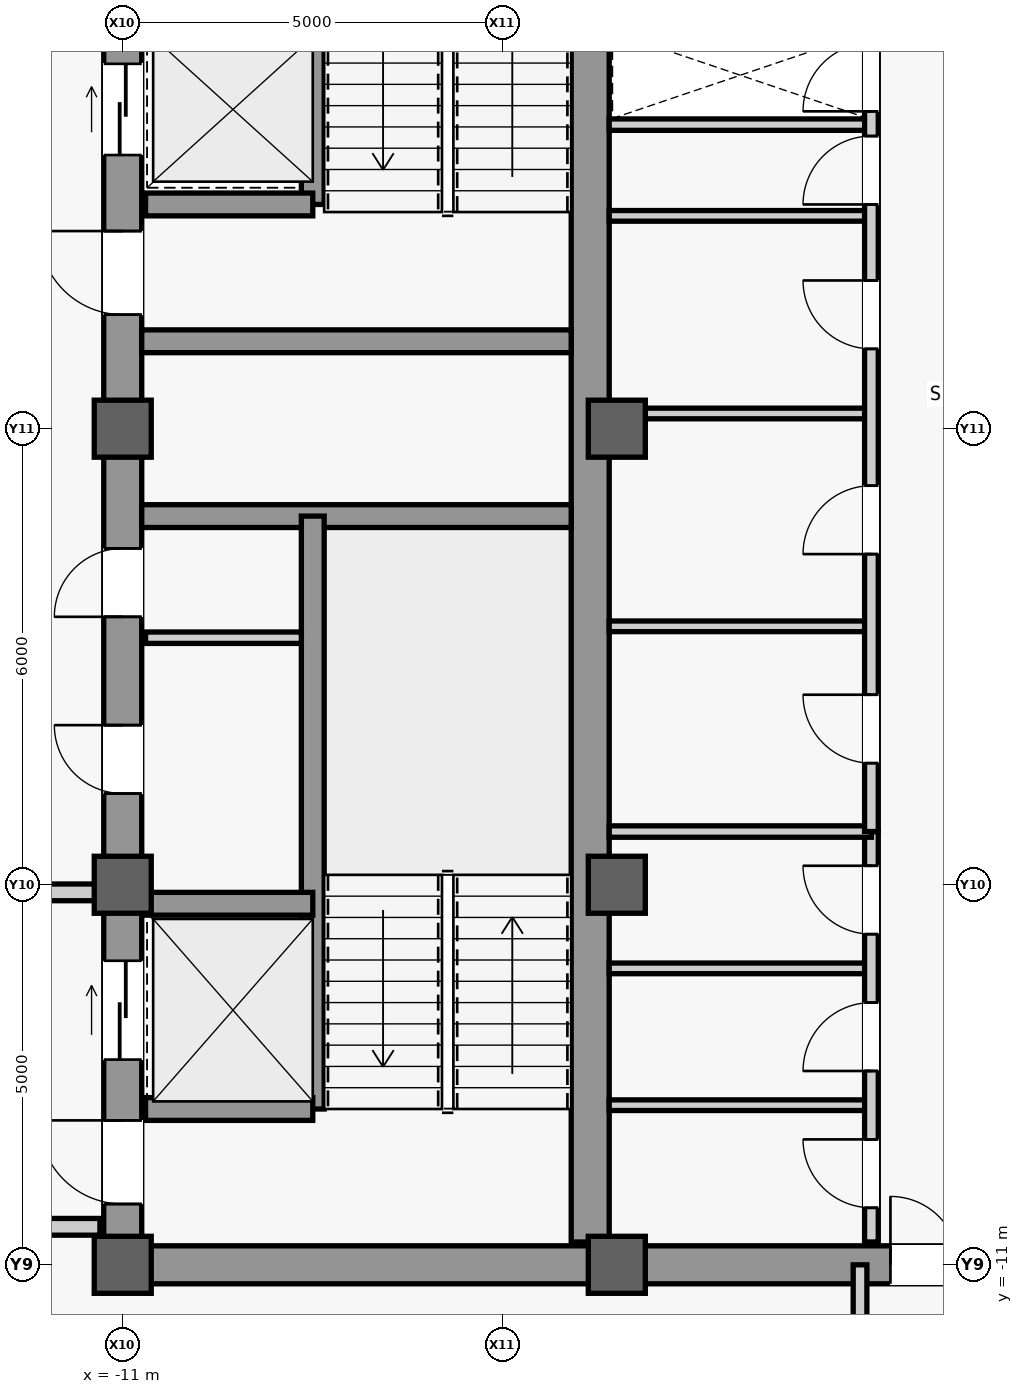
"""IFC4 building model, lengths in metres.
Left out: names, types, materials, properties, quantities, classifications, styles, units other than length and angle.
Written with IfcOpenShell. Run it as: python <this file> out.ifc"""

import sys

from ifc_helpers import new_model, si_unit, direction, frame, frame_2d, origin, origin_2d, place, context, subcontext, project, spatial, rectangle, extrude, source, transform, mapped, element, fill, save


model = new_model("IFC4")
c1 = context("Model", 3, precision=1e-05, world=origin(), true_north=direction((0.0, 1.0)))
c2 = subcontext(c1, "Body", "Model", "MODEL_VIEW")
j1 = project(units=[si_unit("LENGTHUNIT", "METRE"), si_unit("PLANEANGLEUNIT", "RADIAN")], contexts=[c1])
p1 = place(None, origin())
s1 = spatial("IfcSite", under=j1, at=p1, CompositionType="ELEMENT")
p2 = place(p1, origin())
s2 = spatial("IfcBuilding", under=s1, at=p2, CompositionType="ELEMENT")
p3 = place(p2, frame((0.0, 0.0, 358.3)))
s3 = spatial("IfcBuildingStorey", under=s2, at=p3, CompositionType="ELEMENT", Elevation=358.3)
m1 = source(origin(), c2, "Body", "SweptSolid", [
    extrude(rectangle(XDim=22.0, YDim=0.5, at=frame_2d((11.0, 0.0))), origin(), (0.0, 0.0, 1.0), 3.74),
])
p4 = place(p3, frame((-11.0, -11.0, 0.0), z_axis=(0.0, 0.0, 1.0), x_axis=(0.0, 1.0, 0.0)))
e1 = element("IfcWall", 1, at=p4, inside=s3, PredefinedType="SHEAR", context=c2, shape_type="MappedRepresentation", body=[
    mapped(m1, transform((0.0, 0.0, 0.0), scale=1.0)),
])
m2 = source(origin(), c2, "Body", "SweptSolid", [
    extrude(rectangle(XDim=1.1, YDim=2.2, at=frame_2d((0.55, 1.1))), frame((0.0, 0.26, 0.0), z_axis=(0.0, -1.0, 0.0), x_axis=(1.0, 0.0, 0.0)), (0.0, 0.0, 1.0), 0.52),
])
p5 = place(p4, frame((0.8, 0.0, 0.0)))
e2 = element("IfcOpeningElement", 2, at=p5, cuts=e1, PredefinedType="OPENING", context=c2, shape_type="MappedRepresentation", body=[
    mapped(m2, transform((0.0, 0.0, 0.0), scale=1.0)),
])
p6 = place(p4, frame((12.5, 0.0, 0.0)))
e3 = element("IfcOpeningElement", 3, at=p6, cuts=e1, PredefinedType="OPENING", context=c2, shape_type="MappedRepresentation", body=[
    mapped(m2, transform((0.0, 0.0, 0.0), scale=1.0)),
])
m3 = source(origin(), c2, "Body", "SweptSolid", [
    extrude(rectangle(XDim=0.9, YDim=2.15, at=frame_2d((0.45, 1.075))), frame((0.0, 0.26, 0.0), z_axis=(0.0, -1.0, 0.0), x_axis=(1.0, 0.0, 0.0)), (0.0, 0.0, 1.0), 0.52),
])
p7 = place(p4, frame((6.2, 0.0, 0.0)))
e4 = element("IfcOpeningElement", 4, at=p7, cuts=e1, PredefinedType="OPENING", context=c2, shape_type="MappedRepresentation", body=[
    mapped(m3, transform((0.0, 0.0, 0.0), scale=1.0)),
])
p8 = place(p4, frame((8.525, 0.0, 0.0)))
e5 = element("IfcOpeningElement", 5, at=p8, cuts=e1, PredefinedType="OPENING", context=c2, shape_type="MappedRepresentation", body=[
    mapped(m3, transform((0.0, 0.0, 0.0), scale=1.0)),
])
m4 = source(origin(), c2, "Body", "SweptSolid", [
    extrude(rectangle(XDim=1.2, YDim=2.3, at=frame_2d((0.6, 1.15))), frame((0.0, 0.26, 0.0), z_axis=(0.0, -1.0, 0.0), x_axis=(1.0, 0.0, 0.0)), (0.0, 0.0, 1.0), 0.52),
])
p9 = place(p4, frame((14.6, 0.0, 0.0)))
e6 = element("IfcOpeningElement", 6, at=p9, cuts=e1, PredefinedType="OPENING", context=c2, shape_type="MappedRepresentation", body=[
    mapped(m4, transform((0.0, 0.0, 0.0), scale=1.0)),
])
p10 = place(p4, frame((18.2, 0.0, 0.0)))
e7 = element("IfcOpeningElement", 7, at=p10, cuts=e1, PredefinedType="OPENING", context=c2, shape_type="MappedRepresentation", body=[
    mapped(m4, transform((0.0, 0.0, 0.0), scale=1.0)),
])
m5 = source(origin(), c2, "Body", "SweptSolid", [
    extrude(rectangle(XDim=1.3, YDim=2.3, at=frame_2d((0.65, 1.15))), frame((0.0, 0.26, 0.0), z_axis=(0.0, -1.0, 0.0), x_axis=(1.0, 0.0, 0.0)), (0.0, 0.0, 1.0), 0.52),
])
p11 = place(p4, frame((2.7, 0.0, 0.0)))
e8 = element("IfcOpeningElement", 8, at=p11, cuts=e1, PredefinedType="OPENING", context=c2, shape_type="MappedRepresentation", body=[
    mapped(m5, transform((0.0, 0.0, 0.0), scale=1.0)),
])
m6 = source(origin(), c2, "Body", "SweptSolid", [
    extrude(rectangle(XDim=21.4, YDim=0.5, at=frame_2d((10.7, 0.0))), origin(), (0.0, 0.0, 1.0), 3.74),
])
p12 = place(p3, frame((-4.85, -10.7, 0.0), z_axis=(0.0, 0.0, 1.0), x_axis=(0.0, 1.0, 0.0)))
e9 = element("IfcWall", 9, at=p12, inside=s3, PredefinedType="SHEAR", context=c2, shape_type="MappedRepresentation", body=[
    mapped(m6, transform((0.0, 0.0, 0.0), scale=1.0)),
])
m7 = source(origin(), c2, "Body", "SweptSolid", [
    extrude(rectangle(XDim=5.9, YDim=0.5, at=frame_2d((2.95, 0.0))), origin(), (0.0, 0.0, 1.0), 3.74),
])
p13 = place(p3, frame((-10.75, -11.0, 0.0), z_axis=(0.0, 0.0, 1.0), x_axis=(1.0, 0.0, 0.0)))
e10 = element("IfcWall", 10, at=p13, inside=s3, PredefinedType="SHEAR", context=c2, shape_type="MappedRepresentation", body=[
    mapped(m7, transform((0.0, 0.0, 0.0), scale=1.0)),
])
m8 = source(origin(), c2, "Body", "SweptSolid", [
    extrude(rectangle(XDim=5.65, YDim=0.3, at=frame_2d((2.825, 0.0))), origin(), (0.0, 0.0, 1.0), 3.74),
])
for number, where, z_axis, x_axis in (
    (11, (-10.75, -1.15, 0.0), (0.0, 0.0, 1.0), (1.0, 0.0, 0.0)),
    (12, (-10.75, 1.15, 0.0), (0.0, 0.0, 1.0), (1.0, 0.0, 0.0)),
):
    element("IfcWall", number, at=place(p3, frame(where, z_axis=z_axis, x_axis=x_axis)), inside=s3, PredefinedType="SHEAR", context=c2, shape_type="MappedRepresentation", body=[
        mapped(m8, transform((0.0, 0.0, 0.0), scale=1.0)),
    ])
m9 = source(origin(), c2, "Body", "SweptSolid", [
    extrude(rectangle(XDim=9.2, YDim=0.5, at=frame_2d((4.6, 0.0))), origin(), (0.0, 0.0, 1.0), 3.74),
])
p14 = place(p3, frame((-4.6, -11.0, 0.0), z_axis=(0.0, 0.0, 1.0), x_axis=(1.0, 0.0, 0.0)))
e13 = element("IfcWall", 13, at=p14, inside=s3, PredefinedType="SHEAR", context=c2, shape_type="MappedRepresentation", body=[
    mapped(m9, transform((0.0, 0.0, 0.0), scale=1.0)),
])
m10 = source(origin(), c2, "Body", "SweptSolid", [
    extrude(rectangle(XDim=1.8, YDim=2.25, at=frame_2d((0.9, 1.125))), frame((0.0, 0.26, 0.0), z_axis=(0.0, -1.0, 0.0), x_axis=(1.0, 0.0, 0.0)), (0.0, 0.0, 1.0), 0.52),
])
p15 = place(p14, frame((3.7, 0.0, 0.0)))
e14 = element("IfcOpeningElement", 14, at=p15, cuts=e13, PredefinedType="OPENING", context=c2, shape_type="MappedRepresentation", body=[
    mapped(m10, transform((0.0, 0.0, 0.0), scale=1.0)),
])
m11 = source(origin(), c2, "Body", "SweptSolid", [
    extrude(rectangle(XDim=0.75, YDim=0.75, at=origin_2d()), origin(), (0.0, 0.0, 1.0), 4.0),
])
for number, where, z_axis, x_axis in (
    (15, (-11.0, -11.0, 0.0), (0.0, 0.0, 1.0), (1.0, 0.0, 0.0)),
    (16, (-11.0, -6.0, 0.0), (0.0, 0.0, 1.0), (1.0, 0.0, 0.0)),
    (17, (-11.0, 0.0, 0.0), (0.0, 0.0, 1.0), (1.0, 0.0, 0.0)),
    (18, (-4.5, -11.0, 0.0), (0.0, 0.0, 1.0), (1.0, 0.0, 0.0)),
    (19, (-4.5, -6.0, 0.0), (0.0, 0.0, 1.0), (1.0, 0.0, 0.0)),
    (20, (-4.5, 0.0, 0.0), (0.0, 0.0, 1.0), (1.0, 0.0, 0.0)),
):
    element("IfcColumn", number, at=place(p3, frame(where, z_axis=z_axis, x_axis=x_axis)), inside=s3, PredefinedType="COLUMN", context=c2, shape_type="MappedRepresentation", body=[
        mapped(m11, transform((0.0, 0.0, 0.0), scale=1.0)),
    ])
m12 = source(origin(), c2, "Body", "SweptSolid", [
    extrude(rectangle(XDim=7.8, YDim=0.3, at=frame_2d((3.9, 0.0))), origin(), (0.0, 0.0, 1.0), 3.74),
])
p16 = place(p3, frame((-8.5, -8.95, 0.0), z_axis=(0.0, 0.0, 1.0), x_axis=(0.0, 1.0, 0.0)))
e21 = element("IfcWall", 21, at=p16, inside=s3, PredefinedType="SHEAR", context=c2, shape_type="MappedRepresentation", body=[
    mapped(m12, transform((0.0, 0.0, 0.0), scale=1.0)),
])
m13 = source(origin(), c2, "Body", "SweptSolid", [
    extrude(rectangle(XDim=2.2, YDim=0.3, at=frame_2d((1.1, 0.0))), origin(), (0.0, 0.0, 1.0), 3.74),
])
for number, where, z_axis, x_axis in (
    (22, (-10.7, -8.95, 0.0), (0.0, 0.0, 1.0), (1.0, 0.0, 0.0)),
    (23, (-10.7, -6.25, 0.0), (0.0, 0.0, 1.0), (1.0, 0.0, 0.0)),
):
    element("IfcWall", number, at=place(p3, frame(where, z_axis=z_axis, x_axis=x_axis)), inside=s3, PredefinedType="SHEAR", context=c2, shape_type="MappedRepresentation", body=[
        mapped(m13, transform((0.0, 0.0, 0.0), scale=1.0)),
    ])
m14 = source(origin(), c2, "Body", "SweptSolid", [
    extrude(rectangle(XDim=7.75, YDim=0.3, at=frame_2d((3.875, 0.0))), origin(), (0.0, 0.0, 1.0), 3.74),
])
p17 = place(p3, frame((-8.5, 2.95, 0.0), z_axis=(0.0, 0.0, 1.0), x_axis=(0.0, 1.0, 0.0)))
e24 = element("IfcWall", 24, at=p17, inside=s3, PredefinedType="SHEAR", context=c2, shape_type="MappedRepresentation", body=[
    mapped(m14, transform((0.0, 0.0, 0.0), scale=1.0)),
])
p18 = place(p3, frame((-10.7, 2.95, 0.0), z_axis=(0.0, 0.0, 1.0), x_axis=(1.0, 0.0, 0.0)))
e25 = element("IfcWall", 25, at=p18, inside=s3, PredefinedType="SHEAR", context=c2, shape_type="MappedRepresentation", body=[
    mapped(m13, transform((0.0, 0.0, 0.0), scale=1.0)),
])
m15 = source(origin(), c2, "Body", "SweptSolid", [
    extrude(rectangle(XDim=2.05, YDim=0.15, at=frame_2d((1.025, 0.0))), origin(), (0.0, 0.0, 1.0), 3.74),
])
p19 = place(p3, frame((-10.7, -2.75, 0.0), z_axis=(0.0, 0.0, 1.0), x_axis=(1.0, 0.0, 0.0)))
e26 = element("IfcWall", 26, at=p19, inside=s3, PredefinedType="PARTITIONING", context=c2, shape_type="MappedRepresentation", body=[
    mapped(m15, transform((0.0, 0.0, 0.0), scale=1.0)),
])
m16 = source(origin(), c2, "Body", "SweptSolid", [
    extrude(rectangle(XDim=4.05, YDim=0.22, at=frame_2d((2.025, 0.0))), origin(), (0.0, 0.0, 1.0), 3.74),
])
p20 = place(p3, frame((-15.35, -10.5, 0.0), z_axis=(0.0, 0.0, 1.0), x_axis=(1.0, 0.0, 0.0)))
e27 = element("IfcWall", 27, at=p20, inside=s3, PredefinedType="PARTITIONING", context=c2, shape_type="MappedRepresentation", body=[
    mapped(m16, transform((0.0, 0.0, 0.0), scale=1.0)),
])
m17 = source(origin(), c2, "Body", "SweptSolid", [
    extrude(rectangle(XDim=4.05, YDim=0.22, at=frame_2d((2.025, 0.0))), origin(), (0.0, 0.0, 1.0), 3.124),
])
p21 = place(p3, frame((-15.35, -6.1, 0.0), z_axis=(0.0, 0.0, 1.0), x_axis=(1.0, 0.0, 0.0)))
e28 = element("IfcWall", 28, at=p21, inside=s3, PredefinedType="PARTITIONING", context=c2, shape_type="MappedRepresentation", body=[
    mapped(m17, transform((0.0, 0.0, 0.0), scale=1.0)),
])
m18 = source(origin(), c2, "Body", "SweptSolid", [
    extrude(rectangle(XDim=3.45, YDim=0.15, at=frame_2d((1.725, 0.0))), origin(), (0.0, 0.0, 1.0), 3.74),
])
p22 = place(p3, frame((-4.6, 4.0, 0.0), z_axis=(0.0, 0.0, 1.0), x_axis=(1.0, 0.0, 0.0)))
e29 = element("IfcWall", 29, at=p22, inside=s3, PredefinedType="PARTITIONING", context=c2, shape_type="MappedRepresentation", body=[
    mapped(m18, transform((0.0, 0.0, 0.0), scale=1.0)),
])
m19 = source(origin(), c2, "Body", "SweptSolid", [
    extrude(rectangle(XDim=3.45, YDim=0.14, at=frame_2d((1.725, 0.0))), origin(), (0.0, 0.0, 1.0), 3.74),
])
for number, where, z_axis, x_axis in (
    (30, (-4.6, -8.9, 0.0), (0.0, 0.0, 1.0), (1.0, 0.0, 0.0)),
    (31, (-4.6, -7.1, 0.0), (0.0, 0.0, 1.0), (1.0, 0.0, 0.0)),
):
    element("IfcWall", number, at=place(p3, frame(where, z_axis=z_axis, x_axis=x_axis)), inside=s3, PredefinedType="PARTITIONING", context=c2, shape_type="MappedRepresentation", body=[
        mapped(m19, transform((0.0, 0.0, 0.0), scale=1.0)),
    ])
m20 = source(origin(), c2, "Body", "SweptSolid", [
    extrude(rectangle(XDim=5.4, YDim=0.18, at=frame_2d((2.7, 0.0))), origin(), (0.0, 0.0, 1.0), 3.74),
])
p23 = place(p3, frame((-1.15, -10.7, 0.0), z_axis=(0.0, 0.0, 1.0), x_axis=(0.0, 1.0, 0.0)))
e32 = element("IfcWall", 32, at=p23, inside=s3, PredefinedType="PARTITIONING", context=c2, shape_type="MappedRepresentation", body=[
    mapped(m20, transform((0.0, 0.0, 0.0), scale=1.0)),
])
m21 = source(origin(), c2, "Body", "SweptSolid", [
    extrude(rectangle(XDim=0.9, YDim=2.15, at=frame_2d((0.45, 1.075))), frame((0.0, 0.1, 0.0), z_axis=(0.0, -1.0, 0.0), x_axis=(1.0, 0.0, 0.0)), (0.0, 0.0, 1.0), 0.2),
])
p24 = place(p23, frame((0.45, 0.0, 0.0)))
e33 = element("IfcOpeningElement", 33, at=p24, cuts=e32, PredefinedType="OPENING", context=c2, shape_type="MappedRepresentation", body=[
    mapped(m21, transform((0.0, 0.0, 0.0), scale=1.0)),
])
p25 = place(p23, frame((2.25, 0.0, 0.0)))
e34 = element("IfcOpeningElement", 34, at=p25, cuts=e32, PredefinedType="OPENING", context=c2, shape_type="MappedRepresentation", body=[
    mapped(m21, transform((0.0, 0.0, 0.0), scale=1.0)),
])
p26 = place(p23, frame((4.05, 0.0, 0.0)))
e35 = element("IfcOpeningElement", 35, at=p26, cuts=e32, PredefinedType="OPENING", context=c2, shape_type="MappedRepresentation", body=[
    mapped(m21, transform((0.0, 0.0, 0.0), scale=1.0)),
])
p27 = place(p3, frame((-4.6, -5.3, 0.0), z_axis=(0.0, 0.0, 1.0), x_axis=(1.0, 0.0, 0.0)))
e36 = element("IfcWall", 36, at=p27, inside=s3, PredefinedType="PARTITIONING", context=c2, shape_type="MappedRepresentation", body=[
    mapped(m18, transform((0.0, 0.0, 0.0), scale=1.0)),
])
p28 = place(p3, frame((-4.6, -2.6, 0.0), z_axis=(0.0, 0.0, 1.0), x_axis=(1.0, 0.0, 0.0)))
e37 = element("IfcWall", 37, at=p28, inside=s3, PredefinedType="PARTITIONING", context=c2, shape_type="MappedRepresentation", body=[
    mapped(m19, transform((0.0, 0.0, 0.0), scale=1.0)),
])
m22 = source(origin(), c2, "Body", "SweptSolid", [
    extrude(rectangle(XDim=3.45, YDim=0.14, at=frame_2d((1.725, 0.0))), origin(), (0.0, 0.0, 1.0), 3.045),
])
p29 = place(p3, frame((-4.6, 0.2, 0.0), z_axis=(0.0, 0.0, 1.0), x_axis=(1.0, 0.0, 0.0)))
e38 = element("IfcWall", 38, at=p29, inside=s3, PredefinedType="PARTITIONING", context=c2, shape_type="MappedRepresentation", body=[
    mapped(m22, transform((0.0, 0.0, 0.0), scale=1.0)),
])
p30 = place(p3, frame((-4.6, 2.8, 0.0), z_axis=(0.0, 0.0, 1.0), x_axis=(1.0, 0.0, 0.0)))
e39 = element("IfcWall", 39, at=p30, inside=s3, PredefinedType="PARTITIONING", context=c2, shape_type="MappedRepresentation", body=[
    mapped(m19, transform((0.0, 0.0, 0.0), scale=1.0)),
])
m23 = source(origin(), c2, "Body", "SweptSolid", [
    extrude(rectangle(XDim=10.6, YDim=0.18, at=frame_2d((5.3, 0.0))), origin(), (0.0, 0.0, 1.0), 3.74),
])
p31 = place(p3, frame((-1.15, -5.3, 0.0), z_axis=(0.0, 0.0, 1.0), x_axis=(0.0, 1.0, 0.0)))
e40 = element("IfcWall", 40, at=p31, inside=s3, PredefinedType="PARTITIONING", context=c2, shape_type="MappedRepresentation", body=[
    mapped(m23, transform((0.0, 0.0, 0.0), scale=1.0)),
])
p32 = place(p31, frame((0.9, 0.0, 0.0)))
e41 = element("IfcOpeningElement", 41, at=p32, cuts=e40, PredefinedType="OPENING", context=c2, shape_type="MappedRepresentation", body=[
    mapped(m21, transform((0.0, 0.0, 0.0), scale=1.0)),
])
p33 = place(p31, frame((3.65, 0.0, 0.0)))
e42 = element("IfcOpeningElement", 42, at=p33, cuts=e40, PredefinedType="OPENING", context=c2, shape_type="MappedRepresentation", body=[
    mapped(m21, transform((0.0, 0.0, 0.0), scale=1.0)),
])
p34 = place(p31, frame((6.35, 0.0, 0.0)))
e43 = element("IfcOpeningElement", 43, at=p34, cuts=e40, PredefinedType="OPENING", context=c2, shape_type="MappedRepresentation", body=[
    mapped(m21, transform((0.0, 0.0, 0.0), scale=1.0)),
])
p35 = place(p31, frame((8.25, 0.0, 0.0)))
e44 = element("IfcOpeningElement", 44, at=p35, cuts=e40, PredefinedType="OPENING", context=c2, shape_type="MappedRepresentation", body=[
    mapped(m21, transform((0.0, 0.0, 0.0), scale=1.0)),
])
p36 = place(p31, frame((9.475, 0.0, 0.0)))
e45 = element("IfcOpeningElement", 45, at=p36, cuts=e40, PredefinedType="OPENING", context=c2, shape_type="MappedRepresentation", body=[
    mapped(m21, transform((0.0, 0.0, 0.0), scale=1.0)),
])
m24 = source(origin(), c2, "Body", "SweptSolid", [
    extrude(rectangle(XDim=5.3, YDim=0.18, at=frame_2d((2.65, 0.0))), origin(), (0.0, 0.0, 1.0), 3.74),
])
p37 = place(p3, frame((-1.3, -16.3, 0.0), z_axis=(0.0, 0.0, 1.0), x_axis=(0.0, 1.0, 0.0)))
e46 = element("IfcWall", 46, at=p37, inside=s3, PredefinedType="PARTITIONING", context=c2, shape_type="MappedRepresentation", body=[
    mapped(m24, transform((0.0, 0.0, 0.0), scale=1.0)),
])
m25 = source(origin(), c2, "Body", "SweptSolid", [
    extrude(rectangle(XDim=1.1, YDim=2.2, at=frame_2d((0.55, 1.1))), frame((0.0, 0.025, 0.0), z_axis=(0.0, -1.0, 0.0), x_axis=(1.0, 0.0, 0.0)), (0.0, 0.0, 1.0), 0.05),
])
p38 = place(p5, origin())
e47 = element("IfcDoor", 47, at=p38, inside=s3, OperationType="SINGLE_SWING_RIGHT", PredefinedType="DOOR", context=c2, shape_type="MappedRepresentation", body=[
    mapped(m25, transform((0.0, 0.0, 0.0), scale=1.0)),
])
fill(e2, e47)
p39 = place(p6, origin())
e48 = element("IfcDoor", 48, at=p39, inside=s3, OperationType="SINGLE_SWING_RIGHT", PredefinedType="DOOR", context=c2, shape_type="MappedRepresentation", body=[
    mapped(m25, transform((0.0, 0.0, 0.0), scale=1.0)),
])
fill(e3, e48)
m26 = source(origin(), c2, "Body", "SweptSolid", [
    extrude(rectangle(XDim=0.9, YDim=2.15, at=frame_2d((0.45, 1.075))), frame((0.0, 0.025, 0.0), z_axis=(0.0, -1.0, 0.0), x_axis=(1.0, 0.0, 0.0)), (0.0, 0.0, 1.0), 0.05),
])
p40 = place(p7, origin())
e49 = element("IfcDoor", 49, at=p40, inside=s3, OperationType="SINGLE_SWING_RIGHT", PredefinedType="DOOR", context=c2, shape_type="MappedRepresentation", body=[
    mapped(m26, transform((0.0, 0.0, 0.0), scale=1.0)),
])
fill(e4, e49)
p41 = place(p8, origin())
e50 = element("IfcDoor", 50, at=p41, inside=s3, OperationType="SINGLE_SWING_LEFT", PredefinedType="DOOR", context=c2, shape_type="MappedRepresentation", body=[
    mapped(m26, transform((0.0, 0.0, 0.0), scale=1.0)),
])
fill(e5, e50)
p42 = place(p24, origin())
e51 = element("IfcDoor", 51, at=p42, inside=s3, OperationType="SINGLE_SWING_RIGHT", PredefinedType="DOOR", context=c2, shape_type="MappedRepresentation", body=[
    mapped(m26, transform((0.0, 0.0, 0.0), scale=1.0)),
])
fill(e33, e51)
p43 = place(p25, origin())
e52 = element("IfcDoor", 52, at=p43, inside=s3, OperationType="SINGLE_SWING_LEFT", PredefinedType="DOOR", context=c2, shape_type="MappedRepresentation", body=[
    mapped(m26, transform((0.0, 0.0, 0.0), scale=1.0)),
])
fill(e34, e52)
p44 = place(p26, origin())
e53 = element("IfcDoor", 53, at=p44, inside=s3, OperationType="SINGLE_SWING_RIGHT", PredefinedType="DOOR", context=c2, shape_type="MappedRepresentation", body=[
    mapped(m26, transform((0.0, 0.0, 0.0), scale=1.0)),
])
fill(e35, e53)
m27 = source(origin(), c2, "Body", "SweptSolid", [
    extrude(rectangle(XDim=1.8, YDim=2.25, at=frame_2d((0.9, 1.125))), frame((0.0, 0.025, 0.0), z_axis=(0.0, -1.0, 0.0), x_axis=(1.0, 0.0, 0.0)), (0.0, 0.0, 1.0), 0.05),
])
p45 = place(p15, origin())
e54 = element("IfcDoor", 54, at=p45, inside=s3, OperationType="SINGLE_SWING_LEFT", PredefinedType="DOOR", context=c2, shape_type="MappedRepresentation", body=[
    mapped(m27, transform((0.0, 0.0, 0.0), scale=1.0)),
])
fill(e14, e54)
p46 = place(p32, origin())
e55 = element("IfcDoor", 55, at=p46, inside=s3, OperationType="SINGLE_SWING_RIGHT", PredefinedType="DOOR", context=c2, shape_type="MappedRepresentation", body=[
    mapped(m26, transform((0.0, 0.0, 0.0), scale=1.0)),
])
fill(e41, e55)
p47 = place(p33, origin())
e56 = element("IfcDoor", 56, at=p47, inside=s3, OperationType="SINGLE_SWING_LEFT", PredefinedType="DOOR", context=c2, shape_type="MappedRepresentation", body=[
    mapped(m26, transform((0.0, 0.0, 0.0), scale=1.0)),
])
fill(e42, e56)
p48 = place(p34, origin())
e57 = element("IfcDoor", 57, at=p48, inside=s3, OperationType="SINGLE_SWING_RIGHT", PredefinedType="DOOR", context=c2, shape_type="MappedRepresentation", body=[
    mapped(m26, transform((0.0, 0.0, 0.0), scale=1.0)),
])
fill(e43, e57)
p49 = place(p35, origin())
e58 = element("IfcDoor", 58, at=p49, inside=s3, OperationType="SINGLE_SWING_LEFT", PredefinedType="DOOR", context=c2, shape_type="MappedRepresentation", body=[
    mapped(m26, transform((0.0, 0.0, 0.0), scale=1.0)),
])
fill(e44, e58)
p50 = place(p36, origin())
e59 = element("IfcDoor", 59, at=p50, inside=s3, OperationType="SINGLE_SWING_LEFT", PredefinedType="DOOR", context=c2, shape_type="MappedRepresentation", body=[
    mapped(m26, transform((0.0, 0.0, 0.0), scale=1.0)),
])
fill(e45, e59)
m28 = source(origin(), c2, "Body", "SweptSolid", [
    extrude(rectangle(XDim=1.2, YDim=2.3, at=frame_2d((0.6, 1.15))), frame((0.0, 0.025, 0.0), z_axis=(0.0, -1.0, 0.0), x_axis=(1.0, 0.0, 0.0)), (0.0, 0.0, 1.0), 0.05),
])
p51 = place(p9, origin())
e60 = element("IfcDoor", 60, at=p51, inside=s3, OperationType="SLIDING_TO_LEFT", PredefinedType="DOOR", context=c2, shape_type="MappedRepresentation", body=[
    mapped(m28, transform((0.0, 0.0, 0.0), scale=1.0)),
])
fill(e6, e60)
m29 = source(origin(), c2, "Body", "SweptSolid", [
    extrude(rectangle(XDim=1.3, YDim=2.3, at=frame_2d((0.65, 1.15))), frame((0.0, 0.025, 0.0), z_axis=(0.0, -1.0, 0.0), x_axis=(1.0, 0.0, 0.0)), (0.0, 0.0, 1.0), 0.05),
])
p52 = place(p11, origin())
e61 = element("IfcDoor", 61, at=p52, inside=s3, OperationType="SLIDING_TO_LEFT", PredefinedType="DOOR", context=c2, shape_type="MappedRepresentation", body=[
    mapped(m29, transform((0.0, 0.0, 0.0), scale=1.0)),
])
fill(e8, e61)
save(model, sys.argv[1])
